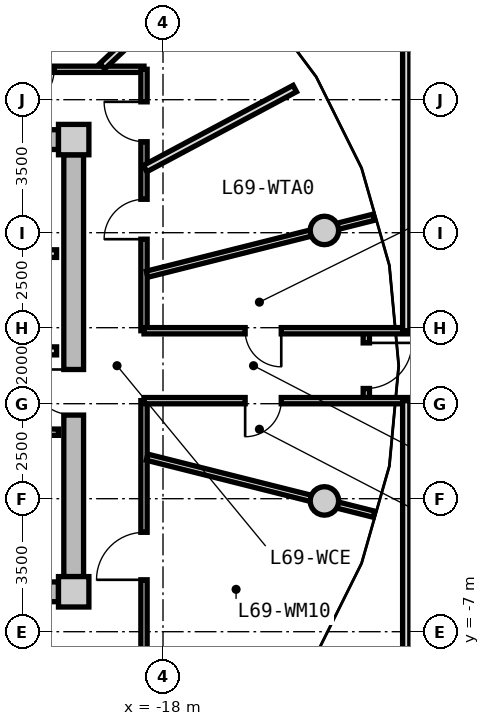
"""IFC4 building model, lengths in metres.
Left out: names, types, materials, properties, quantities, classifications, styles, units other than length and angle.
Written with IfcOpenShell. Run it as: python <this file> out.ifc"""

import sys

from ifc_helpers import new_model, si_unit, direction, frame, frame_2d, origin, origin_2d, place, context, subcontext, project, spatial, rectangle, circle, extrude, source, transform, mapped, element, fill, save


model = new_model("IFC4")
c1 = context("Model", 3, precision=1e-05, world=origin(), true_north=direction((0.0, 1.0)))
c2 = subcontext(c1, "Body", "Model", "MODEL_VIEW")
j1 = project(units=[si_unit("LENGTHUNIT", "METRE"), si_unit("PLANEANGLEUNIT", "RADIAN")], contexts=[c1])
p1 = place(None, origin())
s1 = spatial("IfcSite", under=j1, at=p1, CompositionType="ELEMENT")
p2 = place(p1, origin())
s2 = spatial("IfcBuilding", under=s1, at=p2, CompositionType="ELEMENT")
p3 = place(p2, frame((0.0, 0.0, 223.05)))
s3 = spatial("IfcBuildingStorey", under=s2, at=p3, CompositionType="ELEMENT", Elevation=223.05)
m1 = source(origin(), c2, "Body", "SweptSolid", [
    extrude(rectangle(XDim=0.8, YDim=0.8, at=origin_2d()), origin(), (0.0, 0.0, 1.0), 3.05),
])
for number, where, z_axis, x_axis in (
    (1, (-20.35, -5.95, 0.0), (0.0, 0.0, 1.0), (1.0, 0.0, 0.0)),
    (2, (-20.35, 5.95, 0.0), (0.0, 0.0, 1.0), (1.0, 0.0, 0.0)),
):
    element("IfcColumn", number, at=place(p3, frame(where, z_axis=z_axis, x_axis=x_axis)), inside=s3, PredefinedType="COLUMN", context=c2, shape_type="MappedRepresentation", body=[
        mapped(m1, transform((0.0, 0.0, 0.0), x_axis=(1.0, 0.0, 0.0), y_axis=(0.0, 1.0, 0.0), z_axis=(0.0, 0.0, 1.0), scale=1.0)),
    ])
m2 = source(origin(), c2, "Body", "SweptSolid", [
    extrude(rectangle(XDim=14.5, YDim=0.52, at=frame_2d((7.25, 0.0))), origin(), (0.0, 0.0, 1.0), 2.76),
])
for number, where, z_axis, x_axis in (
    (3, (-35.25, 5.95, 0.0), (0.0, 0.0, 1.0), (1.0, 0.0, 0.0)),
    (4, (-20.75, -5.95, 0.0), (0.0, 0.0, 1.0), (-1.0, 0.0, 0.0)),
):
    element("IfcWall", number, at=place(p3, frame(where, z_axis=z_axis, x_axis=x_axis)), inside=s3, PredefinedType="SHEAR", context=c2, shape_type="MappedRepresentation", body=[
        mapped(m2, transform((0.0, 0.0, 0.0), x_axis=(1.0, 0.0, 0.0), y_axis=(0.0, 1.0, 0.0), z_axis=(0.0, 0.0, 1.0), scale=1.0)),
    ])
m3 = source(origin(), c2, "Body", "SweptSolid", [
    extrude(rectangle(XDim=11.1, YDim=0.52, at=frame_2d((5.55, 0.0))), origin(), (0.0, 0.0, 1.0), 2.76),
])
p4 = place(p3, frame((-20.35, 5.55, 0.0), z_axis=(0.0, 0.0, 1.0), x_axis=(0.0, -1.0, 0.0)))
e5 = element("IfcWall", 5, at=p4, inside=s3, PredefinedType="SHEAR", context=c2, shape_type="MappedRepresentation", body=[
    mapped(m3, transform((0.0, 0.0, 0.0), x_axis=(1.0, 0.0, 0.0), y_axis=(0.0, 1.0, 0.0), z_axis=(0.0, 0.0, 1.0), scale=1.0)),
])
p5 = place(p4, frame((5.65, 0.0, 0.0)))
e6 = element("IfcOpeningElement", 6, at=p5, cuts=e5, PredefinedType="OPENING", context=c2, shape_type="SweptSolid", body=[
    extrude(rectangle(XDim=1.2, YDim=2.15, at=frame_2d((0.6, 1.075))), frame((0.0, 0.27, 0.0), z_axis=(0.0, -1.0, 0.0), x_axis=(1.0, 0.0, 0.0)), (0.0, 0.0, 1.0), 0.54),
])
m4 = source(origin(), c2, "Body", "SweptSolid", [
    extrude(circle(Radius=0.375, at=origin_2d()), origin(), (0.0, 0.0, 1.0), 3.05),
])
for number, where, z_axis, x_axis in (
    (7, (-13.753, 3.559, 0.0), (0.0, 0.0, 1.0), (1.0, 0.0, 0.0)),
    (8, (-13.753, -3.559, 0.0), (0.0, 0.0, 1.0), (1.0, 0.0, 0.0)),
):
    element("IfcColumn", number, at=place(p3, frame(where, z_axis=z_axis, x_axis=x_axis)), inside=s3, PredefinedType="COLUMN", context=c2, shape_type="MappedRepresentation", body=[
        mapped(m4, transform((0.0, 0.0, 0.0), x_axis=(1.0, 0.0, 0.0), y_axis=(0.0, 1.0, 0.0), z_axis=(0.0, 0.0, 1.0), scale=1.0)),
    ])
m5 = source(origin(), c2, "Body", "SweptSolid", [
    extrude(rectangle(XDim=3.2, YDim=0.2, at=frame_2d((1.6, 0.0))), origin(), (0.0, 0.0, 1.0), 2.745),
])
p6 = place(p3, frame((-24.0, 2.95, 0.0), z_axis=(0.0, 0.0, 1.0), x_axis=(1.0, 0.0, 0.0)))
e9 = element("IfcWall", 9, at=p6, inside=s3, PredefinedType="PARTITIONING", context=c2, shape_type="MappedRepresentation", body=[
    mapped(m5, transform((0.0, 0.0, 0.0), x_axis=(1.0, 0.0, 0.0), y_axis=(0.0, 1.0, 0.0), z_axis=(0.0, 0.0, 1.0), scale=1.0)),
])
m6 = source(origin(), c2, "Body", "SweptSolid", [
    extrude(rectangle(XDim=6.66, YDim=0.21, at=frame_2d((3.33, 0.0))), origin(), (0.0, 0.0, 1.0), 2.745),
])
p7 = place(p3, frame((-27.46, 0.39, 0.0), z_axis=(0.0, 0.0, 1.0), x_axis=(1.0, 0.0, 0.0)))
e10 = element("IfcWall", 10, at=p7, inside=s3, PredefinedType="PARTITIONING", context=c2, shape_type="MappedRepresentation", body=[
    mapped(m6, transform((0.0, 0.0, 0.0), x_axis=(1.0, 0.0, 0.0), y_axis=(0.0, 1.0, 0.0), z_axis=(0.0, 0.0, 1.0), scale=1.0)),
])
p8 = place(p7, frame((1.0, 0.0, 0.0)))
e11 = element("IfcOpeningElement", 11, at=p8, cuts=e10, PredefinedType="OPENING", context=c2, shape_type="SweptSolid", body=[
    extrude(rectangle(XDim=1.2, YDim=2.15, at=frame_2d((0.6, 1.075))), frame((0.0, 0.115, 0.0), z_axis=(0.0, -1.0, 0.0), x_axis=(1.0, 0.0, 0.0)), (0.0, 0.0, 1.0), 0.23),
])
m7 = source(origin(), c2, "Body", "SweptSolid", [
    extrude(rectangle(XDim=2.7, YDim=0.165, at=frame_2d((1.35, 0.0))), origin(), (0.0, 0.0, 1.0), 2.745),
])
p9 = place(p3, frame((-23.45, -1.75, 0.0), z_axis=(0.0, 0.0, 1.0), x_axis=(1.0, 0.0, 0.0)))
e12 = element("IfcWall", 12, at=p9, inside=s3, PredefinedType="PARTITIONING", context=c2, shape_type="MappedRepresentation", body=[
    mapped(m7, transform((0.0, 0.0, 0.0), x_axis=(1.0, 0.0, 0.0), y_axis=(0.0, 1.0, 0.0), z_axis=(0.0, 0.0, 1.0), scale=1.0)),
])
p10 = place(p9, frame((0.222, 0.0, 0.0)))
e13 = element("IfcOpeningElement", 13, at=p10, cuts=e12, PredefinedType="OPENING", context=c2, shape_type="SweptSolid", body=[
    extrude(rectangle(XDim=0.925, YDim=2.1, at=frame_2d((0.462, 1.05))), frame((0.0, 0.093, 0.0), z_axis=(0.0, -1.0, 0.0), x_axis=(1.0, 0.0, 0.0)), (0.0, 0.0, 1.0), 0.185),
])
p11 = place(p9, frame((1.522, 0.0, 0.0)))
e14 = element("IfcOpeningElement", 14, at=p11, cuts=e12, PredefinedType="OPENING", context=c2, shape_type="SweptSolid", body=[
    extrude(rectangle(XDim=0.925, YDim=2.1, at=frame_2d((0.462, 1.05))), frame((0.0, 0.093, 0.0), z_axis=(0.0, -1.0, 0.0), x_axis=(1.0, 0.0, 0.0)), (0.0, 0.0, 1.0), 0.185),
])
m8 = source(origin(), c2, "Body", "SweptSolid", [
    extrude(rectangle(XDim=8.58, YDim=0.165, at=frame_2d((4.29, 0.0))), origin(), (0.0, 0.0, 1.0), 2.745),
])
p12 = place(p3, frame((-27.08, 7.8, 0.0), z_axis=(0.0, 0.0, 1.0), x_axis=(1.0, 0.0, 0.0)))
e15 = element("IfcWall", 15, at=p12, inside=s3, PredefinedType="PARTITIONING", context=c2, shape_type="MappedRepresentation", body=[
    mapped(m8, transform((0.0, 0.0, 0.0), x_axis=(1.0, 0.0, 0.0), y_axis=(0.0, 1.0, 0.0), z_axis=(0.0, 0.0, 1.0), scale=1.0)),
])
p13 = place(p12, frame((5.166, 0.0, 0.0)))
e16 = element("IfcOpeningElement", 16, at=p13, cuts=e15, PredefinedType="OPENING", context=c2, shape_type="SweptSolid", body=[
    extrude(rectangle(XDim=1.05, YDim=2.15, at=frame_2d((0.525, 1.075))), frame((0.0, 0.093, 0.0), z_axis=(0.0, -1.0, 0.0), x_axis=(1.0, 0.0, 0.0)), (0.0, 0.0, 1.0), 0.185),
])
p14 = place(p12, frame((2.076, 0.0, 0.0)))
e17 = element("IfcOpeningElement", 17, at=p14, cuts=e15, PredefinedType="OPENING", context=c2, shape_type="SweptSolid", body=[
    extrude(rectangle(XDim=1.05, YDim=2.15, at=frame_2d((0.525, 1.075))), frame((0.0, 0.093, 0.0), z_axis=(0.0, -1.0, 0.0), x_axis=(1.0, 0.0, 0.0)), (0.0, 0.0, 1.0), 0.185),
])
m9 = source(origin(), c2, "Body", "SweptSolid", [
    extrude(rectangle(XDim=6.88, YDim=0.165, at=frame_2d((3.44, 0.0))), origin(), (0.0, 0.0, 1.0), 2.745),
])
p15 = place(p3, frame((-18.5, 7.8, 0.0), z_axis=(0.0, 0.0, 1.0), x_axis=(0.0, -1.0, 0.0)))
e18 = element("IfcWall", 18, at=p15, inside=s3, PredefinedType="PARTITIONING", context=c2, shape_type="MappedRepresentation", body=[
    mapped(m9, transform((0.0, 0.0, 0.0), x_axis=(1.0, 0.0, 0.0), y_axis=(0.0, 1.0, 0.0), z_axis=(0.0, 0.0, 1.0), scale=1.0)),
])
p16 = place(p15, frame((3.421, 0.0, 0.0)))
e19 = element("IfcOpeningElement", 19, at=p16, cuts=e18, PredefinedType="OPENING", context=c2, shape_type="SweptSolid", body=[
    extrude(rectangle(XDim=1.05, YDim=2.15, at=frame_2d((0.525, 1.075))), frame((0.0, 0.093, 0.0), z_axis=(0.0, -1.0, 0.0), x_axis=(1.0, 0.0, 0.0)), (0.0, 0.0, 1.0), 0.185),
])
p17 = place(p15, frame((0.856, 0.0, 0.0)))
e20 = element("IfcOpeningElement", 20, at=p17, cuts=e18, PredefinedType="OPENING", context=c2, shape_type="SweptSolid", body=[
    extrude(rectangle(XDim=1.05, YDim=2.15, at=frame_2d((0.525, 1.075))), frame((0.0, 0.093, 0.0), z_axis=(0.0, -1.0, 0.0), x_axis=(1.0, 0.0, 0.0)), (0.0, 0.0, 1.0), 0.185),
])
p18 = place(p3, frame((-18.5, -0.92, 0.0), z_axis=(0.0, 0.0, 1.0), x_axis=(0.0, -1.0, 0.0)))
e21 = element("IfcWall", 21, at=p18, inside=s3, PredefinedType="PARTITIONING", context=c2, shape_type="MappedRepresentation", body=[
    mapped(m9, transform((0.0, 0.0, 0.0), x_axis=(1.0, 0.0, 0.0), y_axis=(0.0, 1.0, 0.0), z_axis=(0.0, 0.0, 1.0), scale=1.0)),
])
p19 = place(p18, frame((3.464, 0.0, 0.0)))
e22 = element("IfcOpeningElement", 22, at=p19, cuts=e21, PredefinedType="OPENING", context=c2, shape_type="SweptSolid", body=[
    extrude(rectangle(XDim=1.25, YDim=2.2, at=frame_2d((0.625, 1.1))), frame((0.0, 0.093, 0.0), z_axis=(0.0, -1.0, 0.0), x_axis=(1.0, 0.0, 0.0)), (0.0, 0.0, 1.0), 0.185),
])
m10 = source(origin(), c2, "Body", "SweptSolid", [
    extrude(rectangle(XDim=6.157, YDim=0.165, at=frame_2d((3.079, 0.0))), origin(), (0.0, 0.0, 1.0), 2.345),
])
for number, where, z_axis, x_axis in (
    (23, (-18.42, -2.407, 0.0), (0.0, 0.0, 1.0), (0.97, -0.244, 0.0)),
    (24, (-18.42, 2.407, 0.0), (0.0, 0.0, 1.0), (0.97, 0.244, 0.0)),
):
    element("IfcWall", number, at=place(p3, frame(where, z_axis=z_axis, x_axis=x_axis)), inside=s3, PredefinedType="PARTITIONING", context=c2, shape_type="MappedRepresentation", body=[
        mapped(m10, transform((0.0, 0.0, 0.0), x_axis=(1.0, 0.0, 0.0), y_axis=(0.0, 1.0, 0.0), z_axis=(0.0, 0.0, 1.0), scale=1.0)),
    ])
m11 = source(origin(), c2, "Body", "SweptSolid", [
    extrude(rectangle(XDim=4.089, YDim=0.19, at=frame_2d((2.044, 0.0))), origin(), (0.0, 0.0, 1.0), 2.345),
])
p20 = place(p3, frame((-19.598, 7.88, 0.0), z_axis=(0.0, 0.0, 1.0), x_axis=(0.729401273609, 0.684086092577, 0.0)))
e25 = element("IfcWall", 25, at=p20, inside=s3, PredefinedType="PARTITIONING", context=c2, shape_type="MappedRepresentation", body=[
    mapped(m11, transform((0.0, 0.0, 0.0), x_axis=(1.0, 0.0, 0.0), y_axis=(0.0, 1.0, 0.0), z_axis=(0.0, 0.0, 1.0), scale=1.0)),
])
m12 = source(origin(), c2, "Body", "SweptSolid", [
    extrude(rectangle(XDim=4.465, YDim=0.19, at=frame_2d((2.232, 0.0))), origin(), (0.0, 0.0, 1.0), 2.745),
])
p21 = place(p3, frame((-18.47, 5.188, 0.0), z_axis=(0.0, 0.0, 1.0), x_axis=(0.881981829834, 0.471283409259, 0.0)))
e26 = element("IfcWall", 26, at=p21, inside=s3, PredefinedType="PARTITIONING", context=c2, shape_type="MappedRepresentation", body=[
    mapped(m12, transform((0.0, 0.0, 0.0), x_axis=(1.0, 0.0, 0.0), y_axis=(0.0, 1.0, 0.0), z_axis=(0.0, 0.0, 1.0), scale=1.0)),
])
m13 = source(origin(), c2, "Body", "SweptSolid", [
    extrude(rectangle(XDim=5.652, YDim=0.19, at=frame_2d((2.826, 0.0))), origin(), (0.0, 0.0, 1.0), 2.745),
])
p22 = place(p3, frame((-23.206, 7.83, 0.0), z_axis=(0.0, 0.0, 1.0), x_axis=(0.527566076956, 0.84951399897, 0.0)))
e27 = element("IfcWall", 27, at=p22, inside=s3, PredefinedType="PARTITIONING", context=c2, shape_type="MappedRepresentation", body=[
    mapped(m13, transform((0.0, 0.0, 0.0), x_axis=(1.0, 0.0, 0.0), y_axis=(0.0, 1.0, 0.0), z_axis=(0.0, 0.0, 1.0), scale=1.0)),
])
m14 = source(origin(), c2, "Body", "SweptSolid", [
    extrude(rectangle(XDim=1.84, YDim=0.165, at=frame_2d((0.92, 0.0))), origin(), (0.0, 0.0, 1.0), 2.745),
])
p23 = place(p3, frame((-12.65, -0.92, 0.0), z_axis=(0.0, 0.0, 1.0), x_axis=(0.0, 1.0, 0.0)))
e28 = element("IfcWall", 28, at=p23, inside=s3, PredefinedType="PARTITIONING", context=c2, shape_type="MappedRepresentation", body=[
    mapped(m14, transform((0.0, 0.0, 0.0), x_axis=(1.0, 0.0, 0.0), y_axis=(0.0, 1.0, 0.0), z_axis=(0.0, 0.0, 1.0), scale=1.0)),
])
p24 = place(p23, frame((0.32, 0.0, 0.0)))
e29 = element("IfcOpeningElement", 29, at=p24, cuts=e28, PredefinedType="OPENING", context=c2, shape_type="SweptSolid", body=[
    extrude(rectangle(XDim=1.2, YDim=2.15, at=frame_2d((0.6, 1.075))), frame((0.0, 0.093, 0.0), z_axis=(0.0, -1.0, 0.0), x_axis=(1.0, 0.0, 0.0)), (0.0, 0.0, 1.0), 0.185),
])
m15 = source(origin(), c2, "Body", "SweptSolid", [
    extrude(rectangle(XDim=37.0, YDim=0.165, at=frame_2d((18.5, 0.0))), origin(), (0.0, 0.0, 1.0), 2.745),
])
p25 = place(p3, frame((-18.5, -0.92, 0.0), z_axis=(0.0, 0.0, 1.0), x_axis=(1.0, 0.0, 0.0)))
e30 = element("IfcWall", 30, at=p25, inside=s3, PredefinedType="PARTITIONING", context=c2, shape_type="MappedRepresentation", body=[
    mapped(m15, transform((0.0, 0.0, 0.0), x_axis=(1.0, 0.0, 0.0), y_axis=(0.0, 1.0, 0.0), z_axis=(0.0, 0.0, 1.0), scale=1.0)),
])
p26 = place(p25, frame((2.662, 0.0, 0.0)))
e31 = element("IfcOpeningElement", 31, at=p26, cuts=e30, PredefinedType="OPENING", context=c2, shape_type="SweptSolid", body=[
    extrude(rectangle(XDim=0.95, YDim=2.1, at=frame_2d((0.475, 1.05))), frame((0.0, 0.093, 0.0), z_axis=(0.0, -1.0, 0.0), x_axis=(1.0, 0.0, 0.0)), (0.0, 0.0, 1.0), 0.185),
])
p27 = place(p25, frame((33.388, 0.0, 0.0)))
e32 = element("IfcOpeningElement", 32, at=p27, cuts=e30, PredefinedType="OPENING", context=c2, shape_type="SweptSolid", body=[
    extrude(rectangle(XDim=0.95, YDim=2.1, at=frame_2d((0.475, 1.05))), frame((0.0, 0.093, 0.0), z_axis=(0.0, -1.0, 0.0), x_axis=(1.0, 0.0, 0.0)), (0.0, 0.0, 1.0), 0.185),
])
p28 = place(p25, frame((9.075, 0.0, 0.0)))
e33 = element("IfcOpeningElement", 33, at=p28, cuts=e30, PredefinedType="OPENING", context=c2, shape_type="SweptSolid", body=[
    extrude(rectangle(XDim=1.25, YDim=2.2, at=frame_2d((0.625, 1.1))), frame((0.0, 0.093, 0.0), z_axis=(0.0, -1.0, 0.0), x_axis=(1.0, 0.0, 0.0)), (0.0, 0.0, 1.0), 0.185),
])
p29 = place(p25, frame((14.875, 0.0, 0.0)))
e34 = element("IfcOpeningElement", 34, at=p29, cuts=e30, PredefinedType="OPENING", context=c2, shape_type="SweptSolid", body=[
    extrude(rectangle(XDim=1.25, YDim=2.2, at=frame_2d((0.625, 1.1))), frame((0.0, 0.093, 0.0), z_axis=(0.0, -1.0, 0.0), x_axis=(1.0, 0.0, 0.0)), (0.0, 0.0, 1.0), 0.185),
])
p30 = place(p25, frame((23.03, 0.0, 0.0)))
e35 = element("IfcOpeningElement", 35, at=p30, cuts=e30, PredefinedType="OPENING", context=c2, shape_type="SweptSolid", body=[
    extrude(rectangle(XDim=1.25, YDim=2.2, at=frame_2d((0.625, 1.1))), frame((0.0, 0.093, 0.0), z_axis=(0.0, -1.0, 0.0), x_axis=(1.0, 0.0, 0.0)), (0.0, 0.0, 1.0), 0.185),
])
p31 = place(p3, frame((-18.5, 0.92, 0.0), z_axis=(0.0, 0.0, 1.0), x_axis=(1.0, 0.0, 0.0)))
e36 = element("IfcWall", 36, at=p31, inside=s3, PredefinedType="PARTITIONING", context=c2, shape_type="MappedRepresentation", body=[
    mapped(m15, transform((0.0, 0.0, 0.0), x_axis=(1.0, 0.0, 0.0), y_axis=(0.0, 1.0, 0.0), z_axis=(0.0, 0.0, 1.0), scale=1.0)),
])
p32 = place(p31, frame((2.662, 0.0, 0.0)))
e37 = element("IfcOpeningElement", 37, at=p32, cuts=e36, PredefinedType="OPENING", context=c2, shape_type="SweptSolid", body=[
    extrude(rectangle(XDim=0.95, YDim=2.1, at=frame_2d((0.475, 1.05))), frame((0.0, 0.093, 0.0), z_axis=(0.0, -1.0, 0.0), x_axis=(1.0, 0.0, 0.0)), (0.0, 0.0, 1.0), 0.185),
])
p33 = place(p31, frame((33.388, 0.0, 0.0)))
e38 = element("IfcOpeningElement", 38, at=p33, cuts=e36, PredefinedType="OPENING", context=c2, shape_type="SweptSolid", body=[
    extrude(rectangle(XDim=0.95, YDim=2.1, at=frame_2d((0.475, 1.05))), frame((0.0, 0.093, 0.0), z_axis=(0.0, -1.0, 0.0), x_axis=(1.0, 0.0, 0.0)), (0.0, 0.0, 1.0), 0.185),
])
p34 = place(p31, frame((7.64, 0.0, 0.0)))
e39 = element("IfcOpeningElement", 39, at=p34, cuts=e36, PredefinedType="OPENING", context=c2, shape_type="SweptSolid", body=[
    extrude(rectangle(XDim=0.92, YDim=2.1, at=frame_2d((0.46, 1.05))), frame((0.0, 0.093, 0.0), z_axis=(0.0, -1.0, 0.0), x_axis=(1.0, 0.0, 0.0)), (0.0, 0.0, 1.0), 0.185),
])
p35 = place(p31, frame((10.275, 0.0, 0.0)))
e40 = element("IfcOpeningElement", 40, at=p35, cuts=e36, PredefinedType="OPENING", context=c2, shape_type="SweptSolid", body=[
    extrude(rectangle(XDim=1.25, YDim=2.2, at=frame_2d((0.625, 1.1))), frame((0.0, 0.093, 0.0), z_axis=(0.0, -1.0, 0.0), x_axis=(1.0, 0.0, 0.0)), (0.0, 0.0, 1.0), 0.185),
])
p36 = place(p31, frame((14.875, 0.0, 0.0)))
e41 = element("IfcOpeningElement", 41, at=p36, cuts=e36, PredefinedType="OPENING", context=c2, shape_type="SweptSolid", body=[
    extrude(rectangle(XDim=1.25, YDim=2.2, at=frame_2d((0.625, 1.1))), frame((0.0, 0.093, 0.0), z_axis=(0.0, -1.0, 0.0), x_axis=(1.0, 0.0, 0.0)), (0.0, 0.0, 1.0), 0.185),
])
p37 = place(p31, frame((23.03, 0.0, 0.0)))
e42 = element("IfcOpeningElement", 42, at=p37, cuts=e36, PredefinedType="OPENING", context=c2, shape_type="SweptSolid", body=[
    extrude(rectangle(XDim=1.25, YDim=2.2, at=frame_2d((0.625, 1.1))), frame((0.0, 0.093, 0.0), z_axis=(0.0, -1.0, 0.0), x_axis=(1.0, 0.0, 0.0)), (0.0, 0.0, 1.0), 0.185),
])
m16 = source(origin(), c2, "Body", "SweptSolid", [
    extrude(rectangle(XDim=9.88, YDim=0.19, at=frame_2d((4.94, 0.0))), origin(), (0.0, 0.0, 1.0), 2.745),
])
for number, where, z_axis, x_axis in (
    (43, (-11.6, -10.8, 0.0), (0.0, 0.0, 1.0), (0.0, 1.0, 0.0)),
    (44, (-11.6, 0.92, 0.0), (0.0, 0.0, 1.0), (0.0, 1.0, 0.0)),
):
    element("IfcWall", number, at=place(p3, frame(where, z_axis=z_axis, x_axis=x_axis)), inside=s3, PredefinedType="PARTITIONING", context=c2, shape_type="MappedRepresentation", body=[
        mapped(m16, transform((0.0, 0.0, 0.0), x_axis=(1.0, 0.0, 0.0), y_axis=(0.0, 1.0, 0.0), z_axis=(0.0, 0.0, 1.0), scale=1.0)),
    ])
m17 = source(origin(), c2, "Body", "SweptSolid", [
    extrude(rectangle(XDim=1.2, YDim=2.15, at=frame_2d((0.6, 1.075))), frame((0.0, 0.025, 0.0), z_axis=(0.0, -1.0, 0.0), x_axis=(1.0, 0.0, 0.0)), (0.0, 0.0, 1.0), 0.05),
])
p38 = place(p5, frame((1.2, 0.0, 0.0), z_axis=(0.0, 0.0, 1.0), x_axis=(-1.0, 0.0, 0.0)))
e45 = element("IfcDoor", 45, at=p38, inside=s3, OperationType="SINGLE_SWING_RIGHT", PredefinedType="DOOR", context=c2, shape_type="MappedRepresentation", body=[
    mapped(m17, transform((0.0, 0.0, 0.0), x_axis=(1.0, 0.0, 0.0), y_axis=(0.0, 1.0, 0.0), z_axis=(0.0, 0.0, 1.0), scale=1.0)),
])
fill(e6, e45)
m18 = source(origin(), c2, "Body", "SweptSolid", [
    extrude(rectangle(XDim=0.95, YDim=2.1, at=frame_2d((0.475, 1.05))), frame((0.0, 0.025, 0.0), z_axis=(0.0, -1.0, 0.0), x_axis=(1.0, 0.0, 0.0)), (0.0, 0.0, 1.0), 0.05),
])
p39 = place(p26, frame((0.95, 0.0, 0.0), z_axis=(0.0, 0.0, 1.0), x_axis=(-1.0, 0.0, 0.0)))
e46 = element("IfcDoor", 46, at=p39, inside=s3, OperationType="SINGLE_SWING_RIGHT", PredefinedType="DOOR", context=c2, shape_type="MappedRepresentation", body=[
    mapped(m18, transform((0.0, 0.0, 0.0), x_axis=(1.0, 0.0, 0.0), y_axis=(0.0, 1.0, 0.0), z_axis=(0.0, 0.0, 1.0), scale=1.0)),
])
fill(e31, e46)
p40 = place(p32, frame((0.95, 0.0, 0.0), z_axis=(0.0, 0.0, 1.0), x_axis=(-1.0, 0.0, 0.0)))
e47 = element("IfcDoor", 47, at=p40, inside=s3, OperationType="SINGLE_SWING_LEFT", PredefinedType="DOOR", context=c2, shape_type="MappedRepresentation", body=[
    mapped(m18, transform((0.0, 0.0, 0.0), x_axis=(1.0, 0.0, 0.0), y_axis=(0.0, 1.0, 0.0), z_axis=(0.0, 0.0, 1.0), scale=1.0)),
])
fill(e37, e47)
m19 = source(origin(), c2, "Body", "SweptSolid", [
    extrude(rectangle(XDim=1.05, YDim=2.15, at=frame_2d((0.525, 1.075))), frame((0.0, 0.025, 0.0), z_axis=(0.0, -1.0, 0.0), x_axis=(1.0, 0.0, 0.0)), (0.0, 0.0, 1.0), 0.05),
])
p41 = place(p16, frame((1.05, 0.0, 0.0), z_axis=(0.0, 0.0, 1.0), x_axis=(-1.0, 0.0, 0.0)))
e48 = element("IfcDoor", 48, at=p41, inside=s3, OperationType="SINGLE_SWING_LEFT", PredefinedType="DOOR", context=c2, shape_type="MappedRepresentation", body=[
    mapped(m19, transform((0.0, 0.0, 0.0), x_axis=(1.0, 0.0, 0.0), y_axis=(0.0, 1.0, 0.0), z_axis=(0.0, 0.0, 1.0), scale=1.0)),
])
fill(e19, e48)
p42 = place(p17, frame((1.05, 0.0, 0.0), z_axis=(0.0, 0.0, 1.0), x_axis=(-1.0, 0.0, 0.0)))
e49 = element("IfcDoor", 49, at=p42, inside=s3, OperationType="SINGLE_SWING_RIGHT", PredefinedType="DOOR", context=c2, shape_type="MappedRepresentation", body=[
    mapped(m19, transform((0.0, 0.0, 0.0), x_axis=(1.0, 0.0, 0.0), y_axis=(0.0, 1.0, 0.0), z_axis=(0.0, 0.0, 1.0), scale=1.0)),
])
fill(e20, e49)
p43 = place(p13, frame((1.05, 0.0, 0.0), z_axis=(0.0, 0.0, 1.0), x_axis=(-1.0, 0.0, 0.0)))
e50 = element("IfcDoor", 50, at=p43, inside=s3, OperationType="SINGLE_SWING_RIGHT", PredefinedType="DOOR", context=c2, shape_type="MappedRepresentation", body=[
    mapped(m19, transform((0.0, 0.0, 0.0), x_axis=(1.0, 0.0, 0.0), y_axis=(0.0, 1.0, 0.0), z_axis=(0.0, 0.0, 1.0), scale=1.0)),
])
fill(e16, e50)
m20 = source(origin(), c2, "Body", "SweptSolid", [
    extrude(rectangle(XDim=1.25, YDim=2.2, at=frame_2d((0.625, 1.1))), frame((0.0, 0.025, 0.0), z_axis=(0.0, -1.0, 0.0), x_axis=(1.0, 0.0, 0.0)), (0.0, 0.0, 1.0), 0.05),
])
p44 = place(p19, frame((1.25, 0.0, 0.0), z_axis=(0.0, 0.0, 1.0), x_axis=(-1.0, 0.0, 0.0)))
e51 = element("IfcDoor", 51, at=p44, inside=s3, OperationType="SINGLE_SWING_LEFT", PredefinedType="DOOR", context=c2, shape_type="MappedRepresentation", body=[
    mapped(m20, transform((0.0, 0.0, 0.0), x_axis=(1.0, 0.0, 0.0), y_axis=(0.0, 1.0, 0.0), z_axis=(0.0, 0.0, 1.0), scale=1.0)),
])
fill(e22, e51)
p45 = place(p24, frame((1.2, 0.0, 0.0), z_axis=(0.0, 0.0, 1.0), x_axis=(-1.0, 0.0, 0.0)))
e52 = element("IfcDoor", 52, at=p45, inside=s3, OperationType="SINGLE_SWING_LEFT", PredefinedType="DOOR", context=c2, shape_type="MappedRepresentation", body=[
    mapped(m17, transform((0.0, 0.0, 0.0), x_axis=(1.0, 0.0, 0.0), y_axis=(0.0, 1.0, 0.0), z_axis=(0.0, 0.0, 1.0), scale=1.0)),
])
fill(e29, e52)
save(model, sys.argv[1])
